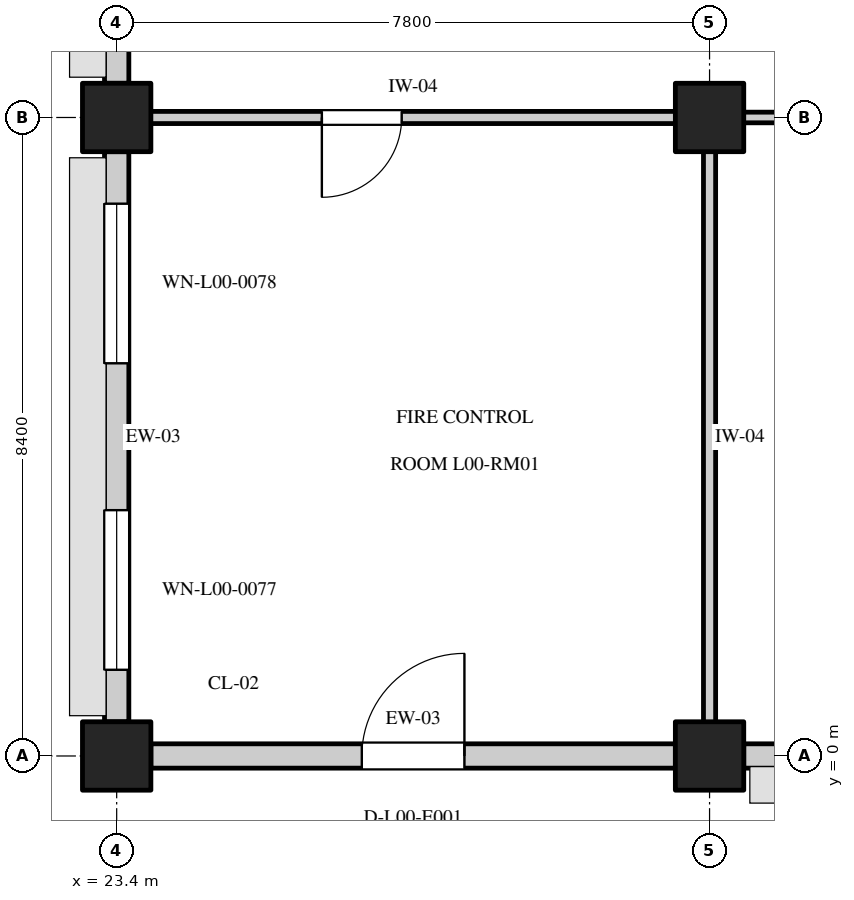
"""IFC4 building model, lengths in metres.
Left out: names, types, materials, properties, quantities, classifications, styles, units other than length and angle.
Written with IfcOpenShell. Run it as: python <this file> out.ifc"""

import sys

from ifc_helpers import new_model, si_unit, direction, frame, frame_2d, origin, origin_2d, place, context, subcontext, project, spatial, rectangle, extrude, element, fill, save


model = new_model("IFC4")
c1 = context("Model", 3, precision=1e-05, world=origin(), true_north=direction((0.0, 1.0)))
c2 = subcontext(c1, "Body", "Model", "MODEL_VIEW")
j1 = project(units=[si_unit("LENGTHUNIT", "METRE"), si_unit("PLANEANGLEUNIT", "RADIAN")], contexts=[c1])
p1 = place(None, origin())
s1 = spatial("IfcSite", under=j1, at=p1, CompositionType="ELEMENT")
p2 = place(p1, origin())
s2 = spatial("IfcBuilding", under=s1, at=p2, CompositionType="ELEMENT")
p3 = place(p2, origin())
s3 = spatial("IfcBuildingStorey", under=s2, at=p3, CompositionType="ELEMENT", Elevation=0.0)
for number, where, z_axis, x_axis in (
    (1, (23.4, 0.0, 0.0), (0.0, 0.0, 1.0), (1.0, 0.0, 0.0)),
    (2, (23.4, 8.4, 0.0), (0.0, 0.0, 1.0), (1.0, 0.0, 0.0)),
    (3, (31.2, 0.0, 0.0), (0.0, 0.0, 1.0), (1.0, 0.0, 0.0)),
    (4, (31.2, 8.4, 0.0), (0.0, 0.0, 1.0), (1.0, 0.0, 0.0)),
):
    element("IfcColumn", number, at=place(p3, frame(where, z_axis=z_axis, x_axis=x_axis)), inside=s3, PredefinedType="COLUMN", context=c2, shape_type="SweptSolid", body=[
        extrude(rectangle(XDim=0.9, YDim=0.9, at=origin_2d()), origin(), (0.0, 0.0, 1.0), 4.8),
    ])
p4 = place(p3, frame((23.85, 0.0, 0.0), z_axis=(0.0, 0.0, 1.0), x_axis=(1.0, 0.0, 0.0)))
e5 = element("IfcWall", 5, at=p4, inside=s3, PredefinedType="STANDARD", context=c2, shape_type="SweptSolid", body=[
    extrude(rectangle(XDim=6.9, YDim=0.32, at=frame_2d((3.45, 0.0))), origin(), (0.0, 0.0, 1.0), 3.75),
])
p5 = place(p4, frame((2.775, 0.0, 0.0)))
e6 = element("IfcOpeningElement", 6, at=p5, cuts=e5, PredefinedType="OPENING", context=c2, shape_type="SweptSolid", body=[
    extrude(rectangle(XDim=1.35, YDim=2.2, at=frame_2d((0.675, 1.1))), frame((0.0, 0.172, 0.0), z_axis=(0.0, -1.0, 0.0), x_axis=(1.0, 0.0, 0.0)), (0.0, 0.0, 1.0), 0.344),
])
p6 = place(p3, frame((31.65, 0.0, 0.0), z_axis=(0.0, 0.0, 1.0), x_axis=(1.0, 0.0, 0.0)))
e7 = element("IfcWall", 7, at=p6, inside=s3, PredefinedType="STANDARD", context=c2, shape_type="SweptSolid", body=[
    extrude(rectangle(XDim=6.9, YDim=0.32, at=frame_2d((3.45, 0.0))), origin(), (0.0, 0.0, 1.0), 3.75),
])
p7 = place(p6, frame((0.528, 0.0, 0.75)))
e8 = element("IfcOpeningElement", 8, at=p7, cuts=e7, PredefinedType="OPENING", context=c2, shape_type="SweptSolid", body=[
    extrude(rectangle(XDim=2.1, YDim=1.55, at=frame_2d((1.05, 0.775))), frame((0.0, 0.172, 0.0), z_axis=(0.0, -1.0, 0.0), x_axis=(1.0, 0.0, 0.0)), (0.0, 0.0, 1.0), 0.344),
])
p8 = place(p6, frame((4.272, 0.0, 0.75)))
e9 = element("IfcOpeningElement", 9, at=p8, cuts=e7, PredefinedType="OPENING", context=c2, shape_type="SweptSolid", body=[
    extrude(rectangle(XDim=2.1, YDim=1.55, at=frame_2d((1.05, 0.775))), frame((0.0, 0.172, 0.0), z_axis=(0.0, -1.0, 0.0), x_axis=(1.0, 0.0, 0.0)), (0.0, 0.0, 1.0), 0.344),
])
p9 = place(p3, frame((23.4, 0.45, 0.0), z_axis=(0.0, 0.0, 1.0), x_axis=(0.0, 1.0, 0.0)))
e10 = element("IfcWall", 10, at=p9, inside=s3, PredefinedType="STANDARD", context=c2, shape_type="SweptSolid", body=[
    extrude(rectangle(XDim=7.5, YDim=0.32, at=frame_2d((3.75, 0.0))), origin(), (0.0, 0.0, 1.0), 3.75),
])
p10 = place(p9, frame((0.684, 0.0, 0.75)))
e11 = element("IfcOpeningElement", 11, at=p10, cuts=e10, PredefinedType="OPENING", context=c2, shape_type="SweptSolid", body=[
    extrude(rectangle(XDim=2.1, YDim=1.65, at=frame_2d((1.05, 0.825))), frame((0.0, 0.172, 0.0), z_axis=(0.0, -1.0, 0.0), x_axis=(1.0, 0.0, 0.0)), (0.0, 0.0, 1.0), 0.344),
])
p11 = place(p9, frame((4.716, 0.0, 0.75)))
e12 = element("IfcOpeningElement", 12, at=p11, cuts=e10, PredefinedType="OPENING", context=c2, shape_type="SweptSolid", body=[
    extrude(rectangle(XDim=2.1, YDim=1.65, at=frame_2d((1.05, 0.825))), frame((0.0, 0.172, 0.0), z_axis=(0.0, -1.0, 0.0), x_axis=(1.0, 0.0, 0.0)), (0.0, 0.0, 1.0), 0.344),
])
p12 = place(p3, frame((23.4, 8.85, 0.0), z_axis=(0.0, 0.0, 1.0), x_axis=(0.0, 1.0, 0.0)))
e13 = element("IfcWall", 13, at=p12, inside=s3, PredefinedType="STANDARD", context=c2, shape_type="SweptSolid", body=[
    extrude(rectangle(XDim=7.5, YDim=0.32, at=frame_2d((3.75, 0.0))), origin(), (0.0, 0.0, 1.0), 3.75),
])
p13 = place(p12, frame((0.684, 0.0, 0.75)))
e14 = element("IfcOpeningElement", 14, at=p13, cuts=e13, PredefinedType="OPENING", context=c2, shape_type="SweptSolid", body=[
    extrude(rectangle(XDim=2.1, YDim=1.55, at=frame_2d((1.05, 0.775))), frame((0.0, 0.172, 0.0), z_axis=(0.0, -1.0, 0.0), x_axis=(1.0, 0.0, 0.0)), (0.0, 0.0, 1.0), 0.344),
])
p14 = place(p12, frame((4.716, 0.0, 0.75)))
e15 = element("IfcOpeningElement", 15, at=p14, cuts=e13, PredefinedType="OPENING", context=c2, shape_type="SweptSolid", body=[
    extrude(rectangle(XDim=2.1, YDim=1.55, at=frame_2d((1.05, 0.775))), frame((0.0, 0.172, 0.0), z_axis=(0.0, -1.0, 0.0), x_axis=(1.0, 0.0, 0.0)), (0.0, 0.0, 1.0), 0.344),
])
p15 = place(p3, frame((23.485, 8.4, 0.0), z_axis=(0.0, 0.0, 1.0), x_axis=(1.0, 0.0, 0.0)))
e16 = element("IfcWall", 16, at=p15, inside=s3, PredefinedType="PARTITIONING", context=c2, shape_type="SweptSolid", body=[
    extrude(rectangle(XDim=7.63, YDim=0.16, at=frame_2d((3.815, 0.0))), origin(), (0.0, 0.0, 1.0), 4.43),
])
p16 = place(p15, frame((2.615, 0.0, 0.0)))
e17 = element("IfcOpeningElement", 17, at=p16, cuts=e16, PredefinedType="OPENING", context=c2, shape_type="SweptSolid", body=[
    extrude(rectangle(XDim=1.05, YDim=2.1, at=frame_2d((0.525, 1.05))), frame((0.0, 0.092, 0.0), z_axis=(0.0, -1.0, 0.0), x_axis=(1.0, 0.0, 0.0)), (0.0, 0.0, 1.0), 0.184),
])
p17 = place(p3, frame((31.2, 0.085, 0.0), z_axis=(0.0, 0.0, 1.0), x_axis=(0.0, 1.0, 0.0)))
e18 = element("IfcWall", 18, at=p17, inside=s3, PredefinedType="PARTITIONING", context=c2, shape_type="SweptSolid", body=[
    extrude(rectangle(XDim=8.23, YDim=0.16, at=frame_2d((4.115, 0.0))), origin(), (0.0, 0.0, 1.0), 4.43),
])
p18 = place(p3, frame((31.285, 8.4, 0.0), z_axis=(0.0, 0.0, 1.0), x_axis=(1.0, 0.0, 0.0)))
e19 = element("IfcWall", 19, at=p18, inside=s3, PredefinedType="PARTITIONING", context=c2, shape_type="SweptSolid", body=[
    extrude(rectangle(XDim=23.23, YDim=0.14, at=frame_2d((11.615, 0.0))), origin(), (0.0, 0.0, 1.0), 4.43),
])
p19 = place(p18, frame((2.694, 0.0, 0.0)))
e20 = element("IfcOpeningElement", 20, at=p19, cuts=e19, PredefinedType="OPENING", context=c2, shape_type="SweptSolid", body=[
    extrude(rectangle(XDim=1.05, YDim=2.1, at=frame_2d((0.525, 1.05))), frame((0.0, 0.082, 0.0), z_axis=(0.0, -1.0, 0.0), x_axis=(1.0, 0.0, 0.0)), (0.0, 0.0, 1.0), 0.164),
])
p20 = place(p5, frame((1.35, 0.0, 0.0), z_axis=(0.0, 0.0, 1.0), x_axis=(-1.0, 0.0, 0.0)))
e21 = element("IfcDoor", 21, at=p20, inside=s3, OperationType="SINGLE_SWING_LEFT", PredefinedType="DOOR", context=c2, shape_type="SweptSolid", body=[
    extrude(rectangle(XDim=1.35, YDim=2.2, at=frame_2d((0.675, 1.1))), frame((0.0, 0.025, 0.0), z_axis=(0.0, -1.0, 0.0), x_axis=(1.0, 0.0, 0.0)), (0.0, 0.0, 1.0), 0.05),
])
fill(e6, e21)
p21 = place(p10, origin())
e22 = element("IfcWindow", 22, at=p21, inside=s3, PartitioningType="DOUBLE_PANEL_VERTICAL", PredefinedType="WINDOW", context=c2, shape_type="SweptSolid", body=[
    extrude(rectangle(XDim=2.1, YDim=1.65, at=frame_2d((1.05, 0.825))), frame((0.0, 0.03, 0.0), z_axis=(0.0, -1.0, 0.0), x_axis=(1.0, 0.0, 0.0)), (0.0, 0.0, 1.0), 0.06),
])
fill(e11, e22)
p22 = place(p11, origin())
e23 = element("IfcWindow", 23, at=p22, inside=s3, PartitioningType="DOUBLE_PANEL_VERTICAL", PredefinedType="WINDOW", context=c2, shape_type="SweptSolid", body=[
    extrude(rectangle(XDim=2.1, YDim=1.65, at=frame_2d((1.05, 0.825))), frame((0.0, 0.03, 0.0), z_axis=(0.0, -1.0, 0.0), x_axis=(1.0, 0.0, 0.0)), (0.0, 0.0, 1.0), 0.06),
])
fill(e12, e23)
p23 = place(p16, frame((1.05, 0.0, 0.0), z_axis=(0.0, 0.0, 1.0), x_axis=(-1.0, 0.0, 0.0)))
e24 = element("IfcDoor", 24, at=p23, inside=s3, OperationType="SINGLE_SWING_RIGHT", PredefinedType="DOOR", context=c2, shape_type="SweptSolid", body=[
    extrude(rectangle(XDim=1.05, YDim=2.1, at=frame_2d((0.525, 1.05))), frame((0.0, 0.025, 0.0), z_axis=(0.0, -1.0, 0.0), x_axis=(1.0, 0.0, 0.0)), (0.0, 0.0, 1.0), 0.05),
])
fill(e17, e24)
save(model, sys.argv[1])
